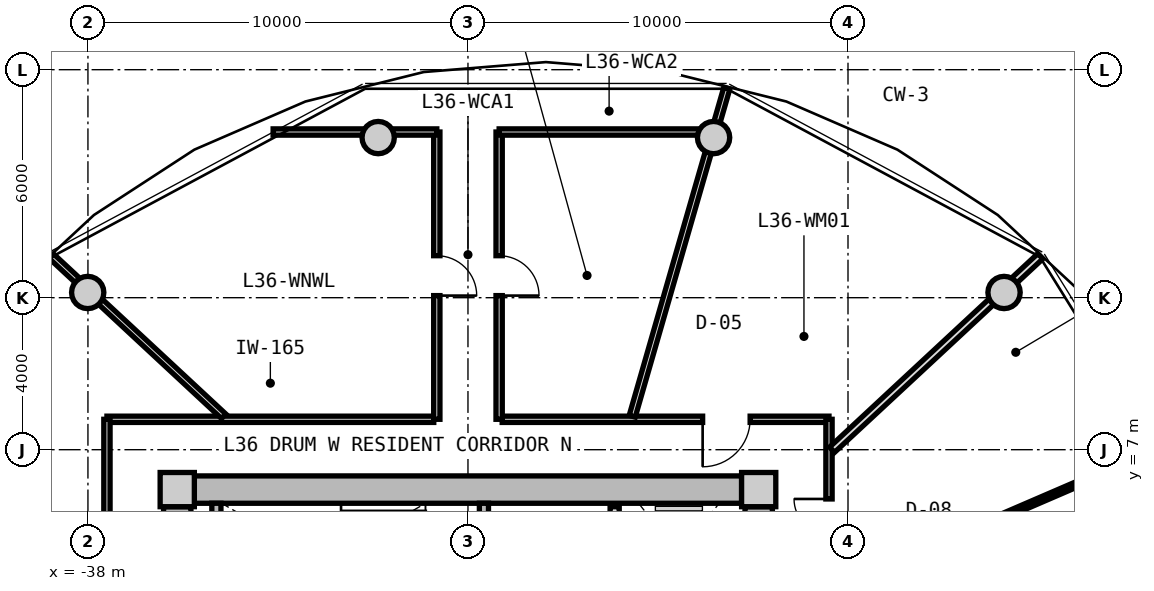
"""IFC4 building model, lengths in metres.
Left out: names, types, materials, properties, quantities, classifications, styles, units other than length and angle.
Written with IfcOpenShell. Run it as: python <this file> out.ifc"""

import sys

from ifc_helpers import new_model, si_unit, direction, frame, frame_2d, origin, origin_2d, place, context, subcontext, project, spatial, rectangle, circle, extrude, source, transform, mapped, element, fill, save


model = new_model("IFC4")
c1 = context("Model", 3, precision=1e-05, world=origin(), true_north=direction((0.0, 1.0)))
c2 = subcontext(c1, "Body", "Model", "MODEL_VIEW")
j1 = project(units=[si_unit("LENGTHUNIT", "METRE"), si_unit("PLANEANGLEUNIT", "RADIAN")], contexts=[c1])
p1 = place(None, origin())
s1 = spatial("IfcSite", under=j1, at=p1, CompositionType="ELEMENT")
p2 = place(p1, origin())
s2 = spatial("IfcBuilding", under=s1, at=p2, CompositionType="ELEMENT")
p3 = place(p2, frame((0.0, 0.0, 117.6)))
s3 = spatial("IfcBuildingStorey", under=s2, at=p3, CompositionType="ELEMENT", Elevation=117.6)
m1 = source(origin(), c2, "Body", "SweptSolid", [
    extrude(rectangle(XDim=0.9, YDim=0.9, at=origin_2d()), origin(), (0.0, 0.0, 1.0), 3.05),
])
for number, where, z_axis, x_axis in (
    (1, (-20.35, 5.95, 0.0), (0.0, 0.0, 1.0), (1.0, 0.0, 0.0)),
    (2, (-35.65, 5.95, 0.0), (0.0, 0.0, 1.0), (1.0, 0.0, 0.0)),
):
    element("IfcColumn", number, at=place(p3, frame(where, z_axis=z_axis, x_axis=x_axis)), inside=s3, PredefinedType="COLUMN", context=c2, shape_type="MappedRepresentation", body=[
        mapped(m1, transform((0.0, 0.0, 0.0), x_axis=(1.0, 0.0, 0.0), y_axis=(0.0, 1.0, 0.0), z_axis=(0.0, 0.0, 1.0), scale=1.0)),
    ])
m2 = source(origin(), c2, "Body", "SweptSolid", [
    extrude(rectangle(XDim=14.4, YDim=0.72, at=frame_2d((7.2, 0.0))), origin(), (0.0, 0.0, 1.0), 2.79),
])
p4 = place(p3, frame((-35.2, 5.95, 0.0), z_axis=(0.0, 0.0, 1.0), x_axis=(1.0, 0.0, 0.0)))
e3 = element("IfcWall", 3, at=p4, inside=s3, PredefinedType="SHEAR", context=c2, shape_type="MappedRepresentation", body=[
    mapped(m2, transform((0.0, 0.0, 0.0), x_axis=(1.0, 0.0, 0.0), y_axis=(0.0, 1.0, 0.0), z_axis=(0.0, 0.0, 1.0), scale=1.0)),
])
m3 = source(origin(), c2, "Body", "SweptSolid", [
    extrude(rectangle(XDim=11.0, YDim=0.72, at=frame_2d((5.5, 0.0))), origin(), (0.0, 0.0, 1.0), 2.79),
])
p5 = place(p3, frame((-35.65, -5.5, 0.0), z_axis=(0.0, 0.0, 1.0), x_axis=(0.0, 1.0, 0.0)))
e4 = element("IfcWall", 4, at=p5, inside=s3, PredefinedType="SHEAR", context=c2, shape_type="MappedRepresentation", body=[
    mapped(m3, transform((0.0, 0.0, 0.0), x_axis=(1.0, 0.0, 0.0), y_axis=(0.0, 1.0, 0.0), z_axis=(0.0, 0.0, 1.0), scale=1.0)),
])
p6 = place(p5, frame((3.8, 0.0, 0.0)))
e5 = element("IfcOpeningElement", 5, at=p6, cuts=e4, PredefinedType="OPENING", context=c2, shape_type="SweptSolid", body=[
    extrude(rectangle(XDim=1.2, YDim=2.15, at=frame_2d((0.6, 1.075))), frame((0.0, 0.37, 0.0), z_axis=(0.0, -1.0, 0.0), x_axis=(1.0, 0.0, 0.0)), (0.0, 0.0, 1.0), 0.74),
])
p7 = place(p3, frame((-20.35, 5.5, 0.0), z_axis=(0.0, 0.0, 1.0), x_axis=(0.0, -1.0, 0.0)))
e6 = element("IfcWall", 6, at=p7, inside=s3, PredefinedType="SHEAR", context=c2, shape_type="MappedRepresentation", body=[
    mapped(m3, transform((0.0, 0.0, 0.0), x_axis=(1.0, 0.0, 0.0), y_axis=(0.0, 1.0, 0.0), z_axis=(0.0, 0.0, 1.0), scale=1.0)),
])
p8 = place(p7, frame((5.65, 0.0, 0.0)))
e7 = element("IfcOpeningElement", 7, at=p8, cuts=e6, PredefinedType="OPENING", context=c2, shape_type="SweptSolid", body=[
    extrude(rectangle(XDim=1.2, YDim=2.15, at=frame_2d((0.6, 1.075))), frame((0.0, 0.37, 0.0), z_axis=(0.0, -1.0, 0.0), x_axis=(1.0, 0.0, 0.0)), (0.0, 0.0, 1.0), 0.74),
])
m4 = source(origin(), c2, "Body", "SweptSolid", [
    extrude(circle(Radius=0.425, at=origin_2d()), origin(), (0.0, 0.0, 1.0), 3.05),
])
for number, where, z_axis, x_axis in (
    (8, (-13.894, 11.137, 0.0), (0.0, 0.0, 1.0), (1.0, 0.0, 0.0)),
    (9, (-21.537, 15.213, 0.0), (0.0, 0.0, 1.0), (1.0, 0.0, 0.0)),
    (10, (-30.363, 15.213, 0.0), (0.0, 0.0, 1.0), (1.0, 0.0, 0.0)),
    (11, (-38.006, 11.137, 0.0), (0.0, 0.0, 1.0), (1.0, 0.0, 0.0)),
):
    element("IfcColumn", number, at=place(p3, frame(where, z_axis=z_axis, x_axis=x_axis)), inside=s3, PredefinedType="COLUMN", context=c2, shape_type="MappedRepresentation", body=[
        mapped(m4, transform((0.0, 0.0, 0.0), x_axis=(1.0, 0.0, 0.0), y_axis=(0.0, 1.0, 0.0), z_axis=(0.0, 0.0, 1.0), scale=1.0)),
    ])
m5 = source(origin(), c2, "Body", "SweptSolid", [
    extrude(rectangle(XDim=3.14, YDim=0.24, at=frame_2d((1.57, 0.0))), origin(), (0.0, 0.0, 1.0), 2.79),
])
p9 = place(p3, frame((-34.62, 2.45, 0.0), z_axis=(0.0, 0.0, 1.0), x_axis=(0.0, 1.0, 0.0)))
e12 = element("IfcWall", 12, at=p9, inside=s3, PredefinedType="PARTITIONING", context=c2, shape_type="MappedRepresentation", body=[
    mapped(m5, transform((0.0, 0.0, 0.0), x_axis=(1.0, 0.0, 0.0), y_axis=(0.0, 1.0, 0.0), z_axis=(0.0, 0.0, 1.0), scale=1.0)),
])
p10 = place(p3, frame((-27.58, 2.45, 0.0), z_axis=(0.0, 0.0, 1.0), x_axis=(0.0, 1.0, 0.0)))
e13 = element("IfcWall", 13, at=p10, inside=s3, PredefinedType="PARTITIONING", context=c2, shape_type="MappedRepresentation", body=[
    mapped(m5, transform((0.0, 0.0, 0.0), x_axis=(1.0, 0.0, 0.0), y_axis=(0.0, 1.0, 0.0), z_axis=(0.0, 0.0, 1.0), scale=1.0)),
])
p11 = place(p10, frame((0.55, 0.0, 0.0)))
e14 = element("IfcOpeningElement", 14, at=p11, cuts=e13, PredefinedType="OPENING", context=c2, shape_type="SweptSolid", body=[
    extrude(rectangle(XDim=1.1, YDim=2.15, at=frame_2d((0.55, 1.075))), frame((0.0, 0.13, 0.0), z_axis=(0.0, -1.0, 0.0), x_axis=(1.0, 0.0, 0.0)), (0.0, 0.0, 1.0), 0.26),
])
m6 = source(origin(), c2, "Body", "SweptSolid", [
    extrude(rectangle(XDim=5.0, YDim=0.24, at=frame_2d((2.5, 0.0))), origin(), (0.0, 0.0, 1.0), 2.775),
])
p12 = place(p3, frame((-24.14, 0.5, 0.0), z_axis=(0.0, 0.0, 1.0), x_axis=(0.0, 1.0, 0.0)))
e15 = element("IfcWall", 15, at=p12, inside=s3, PredefinedType="PARTITIONING", context=c2, shape_type="MappedRepresentation", body=[
    mapped(m6, transform((0.0, 0.0, 0.0), x_axis=(1.0, 0.0, 0.0), y_axis=(0.0, 1.0, 0.0), z_axis=(0.0, 0.0, 1.0), scale=1.0)),
])
p13 = place(p12, frame((3.05, 0.0, 0.0)))
e16 = element("IfcOpeningElement", 16, at=p13, cuts=e15, PredefinedType="OPENING", context=c2, shape_type="SweptSolid", body=[
    extrude(rectangle(XDim=1.3, YDim=2.2, at=frame_2d((0.65, 1.1))), frame((0.0, 0.13, 0.0), z_axis=(0.0, -1.0, 0.0), x_axis=(1.0, 0.0, 0.0)), (0.0, 0.0, 1.0), 0.26),
])
p14 = place(p12, frame((0.55, 0.0, 0.0)))
e17 = element("IfcOpeningElement", 17, at=p14, cuts=e15, PredefinedType="OPENING", context=c2, shape_type="SweptSolid", body=[
    extrude(rectangle(XDim=1.3, YDim=2.2, at=frame_2d((0.65, 1.1))), frame((0.0, 0.13, 0.0), z_axis=(0.0, -1.0, 0.0), x_axis=(1.0, 0.0, 0.0)), (0.0, 0.0, 1.0), 0.26),
])
m7 = source(origin(), c2, "Body", "SweptSolid", [
    extrude(rectangle(XDim=8.6, YDim=0.165, at=frame_2d((4.3, 0.0))), origin(), (0.0, 0.0, 1.0), 2.775),
])
p15 = place(p3, frame((-37.5, 7.8, 0.0), z_axis=(0.0, 0.0, 1.0), x_axis=(1.0, 0.0, 0.0)))
e18 = element("IfcWall", 18, at=p15, inside=s3, PredefinedType="PARTITIONING", context=c2, shape_type="MappedRepresentation", body=[
    mapped(m7, transform((0.0, 0.0, 0.0), x_axis=(1.0, 0.0, 0.0), y_axis=(0.0, 1.0, 0.0), z_axis=(0.0, 0.0, 1.0), scale=1.0)),
])
p16 = place(p3, frame((-27.1, 7.8, 0.0), z_axis=(0.0, 0.0, 1.0), x_axis=(1.0, 0.0, 0.0)))
e19 = element("IfcWall", 19, at=p16, inside=s3, PredefinedType="PARTITIONING", context=c2, shape_type="MappedRepresentation", body=[
    mapped(m7, transform((0.0, 0.0, 0.0), x_axis=(1.0, 0.0, 0.0), y_axis=(0.0, 1.0, 0.0), z_axis=(0.0, 0.0, 1.0), scale=1.0)),
])
p17 = place(p16, frame((5.275, 0.0, 0.0)))
e20 = element("IfcOpeningElement", 20, at=p17, cuts=e19, PredefinedType="OPENING", context=c2, shape_type="SweptSolid", body=[
    extrude(rectangle(XDim=1.25, YDim=2.2, at=frame_2d((0.625, 1.1))), frame((0.0, 0.093, 0.0), z_axis=(0.0, -1.0, 0.0), x_axis=(1.0, 0.0, 0.0)), (0.0, 0.0, 1.0), 0.185),
])
m8 = source(origin(), c2, "Body", "SweptSolid", [
    extrude(rectangle(XDim=15.6, YDim=0.165, at=frame_2d((7.8, 0.0))), origin(), (0.0, 0.0, 1.0), 2.775),
])
p18 = place(p3, frame((-37.5, -7.8, 0.0), z_axis=(0.0, 0.0, 1.0), x_axis=(0.0, 1.0, 0.0)))
e21 = element("IfcWall", 21, at=p18, inside=s3, PredefinedType="PARTITIONING", context=c2, shape_type="MappedRepresentation", body=[
    mapped(m8, transform((0.0, 0.0, 0.0), x_axis=(1.0, 0.0, 0.0), y_axis=(0.0, 1.0, 0.0), z_axis=(0.0, 0.0, 1.0), scale=1.0)),
])
p19 = place(p18, frame((7.175, 0.0, 0.0)))
e22 = element("IfcOpeningElement", 22, at=p19, cuts=e21, PredefinedType="OPENING", context=c2, shape_type="SweptSolid", body=[
    extrude(rectangle(XDim=1.25, YDim=2.2, at=frame_2d((0.625, 1.1))), frame((0.0, 0.093, 0.0), z_axis=(0.0, -1.0, 0.0), x_axis=(1.0, 0.0, 0.0)), (0.0, 0.0, 1.0), 0.185),
])
p20 = place(p3, frame((-18.5, 7.8, 0.0), z_axis=(0.0, 0.0, 1.0), x_axis=(0.0, -1.0, 0.0)))
e23 = element("IfcWall", 23, at=p20, inside=s3, PredefinedType="PARTITIONING", context=c2, shape_type="MappedRepresentation", body=[
    mapped(m8, transform((0.0, 0.0, 0.0), x_axis=(1.0, 0.0, 0.0), y_axis=(0.0, 1.0, 0.0), z_axis=(0.0, 0.0, 1.0), scale=1.0)),
])
p21 = place(p20, frame((12.002, 0.0, 0.0)))
e24 = element("IfcOpeningElement", 24, at=p21, cuts=e23, PredefinedType="OPENING", context=c2, shape_type="SweptSolid", body=[
    extrude(rectangle(XDim=1.05, YDim=2.15, at=frame_2d((0.525, 1.075))), frame((0.0, 0.093, 0.0), z_axis=(0.0, -1.0, 0.0), x_axis=(1.0, 0.0, 0.0)), (0.0, 0.0, 1.0), 0.185),
])
p22 = place(p20, frame((10.211, 0.0, 0.0)))
e25 = element("IfcOpeningElement", 25, at=p22, cuts=e23, PredefinedType="OPENING", context=c2, shape_type="SweptSolid", body=[
    extrude(rectangle(XDim=1.05, YDim=2.15, at=frame_2d((0.525, 1.075))), frame((0.0, 0.093, 0.0), z_axis=(0.0, -1.0, 0.0), x_axis=(1.0, 0.0, 0.0)), (0.0, 0.0, 1.0), 0.185),
])
p23 = place(p20, frame((8.212, 0.0, 0.0)))
e26 = element("IfcOpeningElement", 26, at=p23, cuts=e23, PredefinedType="OPENING", context=c2, shape_type="SweptSolid", body=[
    extrude(rectangle(XDim=1.05, YDim=2.15, at=frame_2d((0.525, 1.075))), frame((0.0, 0.093, 0.0), z_axis=(0.0, -1.0, 0.0), x_axis=(1.0, 0.0, 0.0)), (0.0, 0.0, 1.0), 0.185),
])
p24 = place(p20, frame((6.291, 0.0, 0.0)))
e27 = element("IfcOpeningElement", 27, at=p24, cuts=e23, PredefinedType="OPENING", context=c2, shape_type="SweptSolid", body=[
    extrude(rectangle(XDim=1.05, YDim=2.15, at=frame_2d((0.525, 1.075))), frame((0.0, 0.093, 0.0), z_axis=(0.0, -1.0, 0.0), x_axis=(1.0, 0.0, 0.0)), (0.0, 0.0, 1.0), 0.185),
])
p25 = place(p20, frame((4.739, 0.0, 0.0)))
e28 = element("IfcOpeningElement", 28, at=p25, cuts=e23, PredefinedType="OPENING", context=c2, shape_type="SweptSolid", body=[
    extrude(rectangle(XDim=0.92, YDim=2.1, at=frame_2d((0.46, 1.05))), frame((0.0, 0.093, 0.0), z_axis=(0.0, -1.0, 0.0), x_axis=(1.0, 0.0, 0.0)), (0.0, 0.0, 1.0), 0.185),
])
p26 = place(p20, frame((2.096, 0.0, 0.0)))
e29 = element("IfcOpeningElement", 29, at=p26, cuts=e23, PredefinedType="OPENING", context=c2, shape_type="SweptSolid", body=[
    extrude(rectangle(XDim=0.92, YDim=2.1, at=frame_2d((0.46, 1.05))), frame((0.0, 0.093, 0.0), z_axis=(0.0, -1.0, 0.0), x_axis=(1.0, 0.0, 0.0)), (0.0, 0.0, 1.0), 0.185),
])
m9 = source(origin(), c2, "Body", "SweptSolid", [
    extrude(rectangle(XDim=8.989, YDim=0.165, at=frame_2d((4.495, 0.0))), origin(), (0.0, 0.0, 1.0), 2.275),
])
p27 = place(p3, frame((-23.678, 7.88, 0.0), z_axis=(0.0, 0.0, 1.0), x_axis=(0.27702323008, 0.960863221274, 0.0)))
e30 = element("IfcWall", 30, at=p27, inside=s3, PredefinedType="PARTITIONING", context=c2, shape_type="MappedRepresentation", body=[
    mapped(m9, transform((0.0, 0.0, 0.0), x_axis=(1.0, 0.0, 0.0), y_axis=(0.0, 1.0, 0.0), z_axis=(0.0, 0.0, 1.0), scale=1.0)),
])
m10 = source(origin(), c2, "Body", "SweptSolid", [
    extrude(rectangle(XDim=6.187, YDim=0.165, at=frame_2d((3.093, 0.0))), origin(), (0.0, 0.0, 1.0), 2.275),
])
p28 = place(p3, frame((-34.429, 7.88, 0.0), z_axis=(0.0, 0.0, 1.0), x_axis=(-0.732501077882, 0.680765870841, 0.0)))
e31 = element("IfcWall", 31, at=p28, inside=s3, PredefinedType="PARTITIONING", context=c2, shape_type="MappedRepresentation", body=[
    mapped(m10, transform((0.0, 0.0, 0.0), x_axis=(1.0, 0.0, 0.0), y_axis=(0.0, 1.0, 0.0), z_axis=(0.0, 0.0, 1.0), scale=1.0)),
])
m11 = source(origin(), c2, "Body", "SweptSolid", [
    extrude(rectangle(XDim=7.56, YDim=0.165, at=frame_2d((3.78, 0.0))), origin(), (0.0, 0.0, 1.0), 2.775),
])
p29 = place(p3, frame((-28.82, 7.8, 0.0), z_axis=(0.0, 0.0, 1.0), x_axis=(0.0, 1.0, 0.0)))
e32 = element("IfcWall", 32, at=p29, inside=s3, PredefinedType="PARTITIONING", context=c2, shape_type="MappedRepresentation", body=[
    mapped(m11, transform((0.0, 0.0, 0.0), x_axis=(1.0, 0.0, 0.0), y_axis=(0.0, 1.0, 0.0), z_axis=(0.0, 0.0, 1.0), scale=1.0)),
])
p30 = place(p29, frame((3.255, 0.0, 0.0)))
e33 = element("IfcOpeningElement", 33, at=p30, cuts=e32, PredefinedType="OPENING", context=c2, shape_type="SweptSolid", body=[
    extrude(rectangle(XDim=1.05, YDim=2.15, at=frame_2d((0.525, 1.075))), frame((0.0, 0.093, 0.0), z_axis=(0.0, -1.0, 0.0), x_axis=(1.0, 0.0, 0.0)), (0.0, 0.0, 1.0), 0.185),
])
m12 = source(origin(), c2, "Body", "SweptSolid", [
    extrude(rectangle(XDim=4.307, YDim=0.165, at=frame_2d((2.153, 0.0))), origin(), (0.0, 0.0, 1.0), 2.275),
])
p31 = place(p3, frame((-33.127, 15.36, 0.0), z_axis=(0.0, 0.0, 1.0), x_axis=(1.0, 0.0, 0.0)))
e34 = element("IfcWall", 34, at=p31, inside=s3, PredefinedType="PARTITIONING", context=c2, shape_type="MappedRepresentation", body=[
    mapped(m12, transform((0.0, 0.0, 0.0), x_axis=(1.0, 0.0, 0.0), y_axis=(0.0, 1.0, 0.0), z_axis=(0.0, 0.0, 1.0), scale=1.0)),
])
p32 = place(p3, frame((-27.18, 7.8, 0.0), z_axis=(0.0, 0.0, 1.0), x_axis=(0.0, 1.0, 0.0)))
e35 = element("IfcWall", 35, at=p32, inside=s3, PredefinedType="PARTITIONING", context=c2, shape_type="MappedRepresentation", body=[
    mapped(m11, transform((0.0, 0.0, 0.0), x_axis=(1.0, 0.0, 0.0), y_axis=(0.0, 1.0, 0.0), z_axis=(0.0, 0.0, 1.0), scale=1.0)),
])
p33 = place(p32, frame((3.255, 0.0, 0.0)))
e36 = element("IfcOpeningElement", 36, at=p33, cuts=e35, PredefinedType="OPENING", context=c2, shape_type="SweptSolid", body=[
    extrude(rectangle(XDim=1.05, YDim=2.15, at=frame_2d((0.525, 1.075))), frame((0.0, 0.093, 0.0), z_axis=(0.0, -1.0, 0.0), x_axis=(1.0, 0.0, 0.0)), (0.0, 0.0, 1.0), 0.185),
])
m13 = source(origin(), c2, "Body", "SweptSolid", [
    extrude(rectangle(XDim=5.814, YDim=0.165, at=frame_2d((2.907, 0.0))), origin(), (0.0, 0.0, 1.0), 2.275),
])
p34 = place(p3, frame((-27.18, 15.36, 0.0), z_axis=(0.0, 0.0, 1.0), x_axis=(1.0, 0.0, 0.0)))
e37 = element("IfcWall", 37, at=p34, inside=s3, PredefinedType="PARTITIONING", context=c2, shape_type="MappedRepresentation", body=[
    mapped(m13, transform((0.0, 0.0, 0.0), x_axis=(1.0, 0.0, 0.0), y_axis=(0.0, 1.0, 0.0), z_axis=(0.0, 0.0, 1.0), scale=1.0)),
])
m14 = source(origin(), c2, "Body", "SweptSolid", [
    extrude(rectangle(XDim=7.482, YDim=0.19, at=frame_2d((3.741, 0.0))), origin(), (0.0, 0.0, 1.0), 2.275),
])
p35 = place(p3, frame((-18.42, 6.998, 0.0), z_axis=(0.0, 0.0, 1.0), x_axis=(0.732508698043, 0.680757671489, 0.0)))
e38 = element("IfcWall", 38, at=p35, inside=s3, PredefinedType="PARTITIONING", context=c2, shape_type="MappedRepresentation", body=[
    mapped(m14, transform((0.0, 0.0, 0.0), x_axis=(1.0, 0.0, 0.0), y_axis=(0.0, 1.0, 0.0), z_axis=(0.0, 0.0, 1.0), scale=1.0)),
])
m15 = source(origin(), c2, "Body", "SweptSolid", [
    extrude(rectangle(XDim=9.447, YDim=0.14, at=frame_2d((4.724, 0.0))), origin(), (0.0, 0.0, 1.0), 2.775),
])
p36 = place(p3, frame((-18.47, 3.289, 0.0), z_axis=(0.0, 0.0, 1.0), x_axis=(0.918162367414, 0.396204324894, 0.0)))
e39 = element("IfcWall", 39, at=p36, inside=s3, PredefinedType="PARTITIONING", context=c2, shape_type="MappedRepresentation", body=[
    mapped(m15, transform((0.0, 0.0, 0.0), x_axis=(1.0, 0.0, 0.0), y_axis=(0.0, 1.0, 0.0), z_axis=(0.0, 0.0, 1.0), scale=1.0)),
])
m16 = source(origin(), c2, "Body", "SweptSolid", [
    extrude(rectangle(XDim=1.05, YDim=2.15, at=frame_2d((0.525, 1.075))), frame((0.0, 0.025, 0.0), z_axis=(0.0, -1.0, 0.0), x_axis=(1.0, 0.0, 0.0)), (0.0, 0.0, 1.0), 0.05),
])
p37 = place(p30, frame((1.05, 0.0, 0.0), z_axis=(0.0, 0.0, 1.0), x_axis=(-1.0, 0.0, 0.0)))
e40 = element("IfcDoor", 40, at=p37, inside=s3, OperationType="SINGLE_SWING_RIGHT", PredefinedType="DOOR", context=c2, shape_type="MappedRepresentation", body=[
    mapped(m16, transform((0.0, 0.0, 0.0), x_axis=(1.0, 0.0, 0.0), y_axis=(0.0, 1.0, 0.0), z_axis=(0.0, 0.0, 1.0), scale=1.0)),
])
fill(e33, e40)
p38 = place(p33, frame((1.05, 0.0, 0.0), z_axis=(0.0, 0.0, 1.0), x_axis=(-1.0, 0.0, 0.0)))
e41 = element("IfcDoor", 41, at=p38, inside=s3, OperationType="SINGLE_SWING_RIGHT", PredefinedType="DOOR", context=c2, shape_type="MappedRepresentation", body=[
    mapped(m16, transform((0.0, 0.0, 0.0), x_axis=(1.0, 0.0, 0.0), y_axis=(0.0, 1.0, 0.0), z_axis=(0.0, 0.0, 1.0), scale=1.0)),
])
fill(e36, e41)
m17 = source(origin(), c2, "Body", "SweptSolid", [
    extrude(rectangle(XDim=0.92, YDim=2.1, at=frame_2d((0.46, 1.05))), frame((0.0, 0.025, 0.0), z_axis=(0.0, -1.0, 0.0), x_axis=(1.0, 0.0, 0.0)), (0.0, 0.0, 1.0), 0.05),
])
p39 = place(p26, frame((0.92, 0.0, 0.0), z_axis=(0.0, 0.0, 1.0), x_axis=(-1.0, 0.0, 0.0)))
e42 = element("IfcDoor", 42, at=p39, inside=s3, OperationType="SINGLE_SWING_RIGHT", PredefinedType="DOOR", context=c2, shape_type="MappedRepresentation", body=[
    mapped(m17, transform((0.0, 0.0, 0.0), x_axis=(1.0, 0.0, 0.0), y_axis=(0.0, 1.0, 0.0), z_axis=(0.0, 0.0, 1.0), scale=1.0)),
])
fill(e29, e42)
m18 = source(origin(), c2, "Body", "SweptSolid", [
    extrude(rectangle(XDim=1.25, YDim=2.2, at=frame_2d((0.625, 1.1))), frame((0.0, 0.025, 0.0), z_axis=(0.0, -1.0, 0.0), x_axis=(1.0, 0.0, 0.0)), (0.0, 0.0, 1.0), 0.05),
])
p40 = place(p17, frame((1.25, 0.0, 0.0), z_axis=(0.0, 0.0, 1.0), x_axis=(-1.0, 0.0, 0.0)))
e43 = element("IfcDoor", 43, at=p40, inside=s3, OperationType="SINGLE_SWING_RIGHT", PredefinedType="DOOR", context=c2, shape_type="MappedRepresentation", body=[
    mapped(m18, transform((0.0, 0.0, 0.0), x_axis=(1.0, 0.0, 0.0), y_axis=(0.0, 1.0, 0.0), z_axis=(0.0, 0.0, 1.0), scale=1.0)),
])
fill(e20, e43)
save(model, sys.argv[1])
